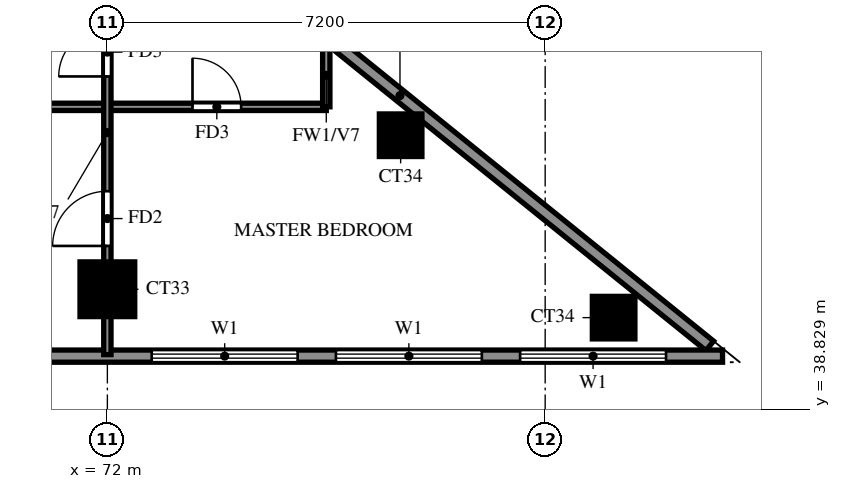
"""IFC4 building model, lengths in metres.
Left out: names, types, materials, properties, quantities, classifications, styles, units other than length and angle.
Written with IfcOpenShell. Run it as: python <this file> out.ifc"""

import sys

from ifc_helpers import new_model, si_unit, direction, frame, frame_2d, origin, origin_2d, place, context, subcontext, project, spatial, rectangle, extrude, source, transform, mapped, element, fill, save


model = new_model("IFC4")
c1 = context("Model", 3, precision=1e-05, world=origin(), true_north=direction((0.0, 1.0)))
c2 = subcontext(c1, "Body", "Model", "MODEL_VIEW")
j1 = project(units=[si_unit("LENGTHUNIT", "METRE"), si_unit("PLANEANGLEUNIT", "RADIAN")], contexts=[c1])
p1 = place(None, origin())
s1 = spatial("IfcSite", under=j1, at=p1, CompositionType="ELEMENT")
p2 = place(p1, origin())
s2 = spatial("IfcBuilding", under=s1, at=p2, CompositionType="ELEMENT")
p3 = place(p2, frame((0.0, 0.0, 229.0)))
s3 = spatial("IfcBuildingStorey", under=s2, at=p3, CompositionType="ELEMENT", Elevation=229.0)
m1 = source(origin(), c2, "Body", "SweptSolid", [
    extrude(rectangle(XDim=0.7, YDim=0.7, at=origin_2d()), origin(), (0.0, 0.0, 1.0), 3.22),
])
p4 = place(p3, frame((80.326, 40.333, 0.0), z_axis=(0.0, 0.0, 1.0), x_axis=(1.0, 0.0, 0.0)))
e1 = element("IfcColumn", 1, at=p4, inside=s3, PredefinedType="COLUMN", context=c2, shape_type="MappedRepresentation", body=[
    mapped(m1, transform((0.0, 0.0, 0.0))),
])
m2 = source(origin(), c2, "Body", "SweptSolid", [
    extrude(rectangle(XDim=0.9, YDim=0.9, at=origin_2d()), origin(), (0.0, 0.0, 1.0), 3.22),
])
p5 = place(p3, frame((72.0, 40.8, 0.0), z_axis=(0.0, 0.0, 1.0), x_axis=(1.0, 0.0, 0.0)))
e2 = element("IfcColumn", 2, at=p5, inside=s3, PredefinedType="COLUMN", context=c2, shape_type="MappedRepresentation", body=[
    mapped(m2, transform((0.0, 0.0, 0.0))),
])
p6 = place(p3, frame((76.823, 43.333, 0.0), z_axis=(0.0, 0.0, 1.0), x_axis=(1.0, 0.0, 0.0)))
e3 = element("IfcColumn", 3, at=p6, inside=s3, PredefinedType="COLUMN", context=c2, shape_type="MappedRepresentation", body=[
    mapped(m1, transform((0.0, 0.0, 0.0))),
])
p7 = place(p3, frame((81.907, 39.87, 0.0), z_axis=(0.0, 0.0, 1.0), x_axis=(-0.777936274417, 0.62834318087, 0.0)))
e4 = element("IfcWall", 4, at=p7, inside=s3, PredefinedType="SOLIDWALL", context=c2, shape_type="SweptSolid", body=[
    extrude(rectangle(XDim=13.099, YDim=0.2, at=frame_2d((6.549, 0.0))), origin(), (0.0, 0.0, 1.0), 3.22),
])
p8 = place(p7, frame((9.938, 0.0, 1.5)))
e5 = element("IfcOpeningElement", 5, at=p8, cuts=e4, PredefinedType="OPENING", context=c2, shape_type="SweptSolid", body=[
    extrude(rectangle(XDim=0.9, YDim=0.9, at=frame_2d((0.45, 0.45))), frame((0.0, 0.11, 0.0), z_axis=(0.0, -1.0, 0.0), x_axis=(1.0, 0.0, 0.0)), (0.0, 0.0, 1.0), 0.22),
])
p9 = place(p3, frame((58.8, 39.7, 0.0), z_axis=(0.0, 0.0, 1.0), x_axis=(1.0, 0.0, 0.0)))
e6 = element("IfcWall", 6, at=p9, inside=s3, PredefinedType="SOLIDWALL", context=c2, shape_type="SweptSolid", body=[
    extrude(rectangle(XDim=23.317, YDim=0.2, at=frame_2d((11.658, 0.0))), origin(), (0.0, 0.0, 1.0), 3.22),
])
p10 = place(p9, frame((6.9, 0.0, 0.0)))
e7 = element("IfcOpeningElement", 7, at=p10, cuts=e6, PredefinedType="OPENING", context=c2, shape_type="SweptSolid", body=[
    extrude(rectangle(XDim=1.8, YDim=2.4, at=frame_2d((0.9, 1.2))), frame((0.0, 0.11, 0.0), z_axis=(0.0, -1.0, 0.0), x_axis=(1.0, 0.0, 0.0)), (0.0, 0.0, 1.0), 0.22),
])
p11 = place(p9, frame((1.5, 0.0, 0.6)))
e8 = element("IfcOpeningElement", 8, at=p11, cuts=e6, PredefinedType="OPENING", context=c2, shape_type="SweptSolid", body=[
    extrude(rectangle(XDim=1.8, YDim=2.4, at=frame_2d((0.9, 1.2))), frame((0.0, 0.11, 0.0), z_axis=(0.0, -1.0, 0.0), x_axis=(1.0, 0.0, 0.0)), (0.0, 0.0, 1.0), 0.22),
])
p12 = place(p9, frame((4.5, 0.0, 0.6)))
e9 = element("IfcOpeningElement", 9, at=p12, cuts=e6, PredefinedType="OPENING", context=c2, shape_type="SweptSolid", body=[
    extrude(rectangle(XDim=1.8, YDim=2.4, at=frame_2d((0.9, 1.2))), frame((0.0, 0.11, 0.0), z_axis=(0.0, -1.0, 0.0), x_axis=(1.0, 0.0, 0.0)), (0.0, 0.0, 1.0), 0.22),
])
p13 = place(p9, frame((13.929, 0.0, 0.6)))
e10 = element("IfcOpeningElement", 10, at=p13, cuts=e6, PredefinedType="OPENING", context=c2, shape_type="SweptSolid", body=[
    extrude(rectangle(XDim=2.4, YDim=2.4, at=frame_2d((1.2, 1.2))), frame((0.0, 0.11, 0.0), z_axis=(0.0, -1.0, 0.0), x_axis=(1.0, 0.0, 0.0)), (0.0, 0.0, 1.0), 0.22),
])
p14 = place(p9, frame((16.958, 0.0, 0.6)))
e11 = element("IfcOpeningElement", 11, at=p14, cuts=e6, PredefinedType="OPENING", context=c2, shape_type="SweptSolid", body=[
    extrude(rectangle(XDim=2.4, YDim=2.4, at=frame_2d((1.2, 1.2))), frame((0.0, 0.11, 0.0), z_axis=(0.0, -1.0, 0.0), x_axis=(1.0, 0.0, 0.0)), (0.0, 0.0, 1.0), 0.22),
])
p15 = place(p9, frame((19.988, 0.0, 0.6)))
e12 = element("IfcOpeningElement", 12, at=p15, cuts=e6, PredefinedType="OPENING", context=c2, shape_type="SweptSolid", body=[
    extrude(rectangle(XDim=2.4, YDim=2.4, at=frame_2d((1.2, 1.2))), frame((0.0, 0.11, 0.0), z_axis=(0.0, -1.0, 0.0), x_axis=(1.0, 0.0, 0.0)), (0.0, 0.0, 1.0), 0.22),
])
p16 = place(p3, frame((60.0, 43.8, 0.0), z_axis=(0.0, 0.0, 1.0), x_axis=(1.0, 0.0, 0.0)))
e13 = element("IfcWall", 13, at=p16, inside=s3, PredefinedType="PARTITIONING", context=c2, shape_type="SweptSolid", body=[
    extrude(rectangle(XDim=15.6, YDim=0.12, at=frame_2d((7.8, 0.0))), origin(), (0.0, 0.0, 1.0), 3.22),
])
p17 = place(p16, frame((9.75, 0.0, 0.0)))
e14 = element("IfcOpeningElement", 14, at=p17, cuts=e13, PredefinedType="OPENING", context=c2, shape_type="SweptSolid", body=[
    extrude(rectangle(XDim=0.9, YDim=2.1, at=frame_2d((0.45, 1.05))), frame((0.0, 0.07, 0.0), z_axis=(0.0, -1.0, 0.0), x_axis=(1.0, 0.0, 0.0)), (0.0, 0.0, 1.0), 0.14),
])
p18 = place(p16, frame((3.45, 0.0, 0.0)))
e15 = element("IfcOpeningElement", 15, at=p18, cuts=e13, PredefinedType="OPENING", context=c2, shape_type="SweptSolid", body=[
    extrude(rectangle(XDim=1.5, YDim=2.1, at=frame_2d((0.75, 1.05))), frame((0.0, 0.07, 0.0), z_axis=(0.0, -1.0, 0.0), x_axis=(1.0, 0.0, 0.0)), (0.0, 0.0, 1.0), 0.14),
])
p19 = place(p16, frame((13.4, 0.0, 0.0)))
e16 = element("IfcOpeningElement", 16, at=p19, cuts=e13, PredefinedType="OPENING", context=c2, shape_type="SweptSolid", body=[
    extrude(rectangle(XDim=0.8, YDim=2.1, at=frame_2d((0.4, 1.05))), frame((0.0, 0.07, 0.0), z_axis=(0.0, -1.0, 0.0), x_axis=(1.0, 0.0, 0.0)), (0.0, 0.0, 1.0), 0.14),
])
p20 = place(p3, frame((72.0, 39.725, 0.0), z_axis=(0.0, 0.0, 1.0), x_axis=(0.0, 1.0, 0.0)))
e17 = element("IfcWall", 17, at=p20, inside=s3, PredefinedType="PARTITIONING", context=c2, shape_type="SweptSolid", body=[
    extrude(rectangle(XDim=8.114, YDim=0.12, at=frame_2d((4.057, 0.0))), origin(), (0.0, 0.0, 1.0), 2.32),
])
p21 = place(p20, frame((1.788, 0.0, 0.0)))
e18 = element("IfcOpeningElement", 18, at=p21, cuts=e17, PredefinedType="OPENING", context=c2, shape_type="SweptSolid", body=[
    extrude(rectangle(XDim=0.9, YDim=2.1, at=frame_2d((0.45, 1.05))), frame((0.0, 0.07, 0.0), z_axis=(0.0, -1.0, 0.0), x_axis=(1.0, 0.0, 0.0)), (0.0, 0.0, 1.0), 0.14),
])
p22 = place(p20, frame((4.575, 0.0, 0.0)))
e19 = element("IfcOpeningElement", 19, at=p22, cuts=e17, PredefinedType="OPENING", context=c2, shape_type="SweptSolid", body=[
    extrude(rectangle(XDim=0.8, YDim=2.1, at=frame_2d((0.4, 1.05))), frame((0.0, 0.07, 0.0), z_axis=(0.0, -1.0, 0.0), x_axis=(1.0, 0.0, 0.0)), (0.0, 0.0, 1.0), 0.14),
])
p23 = place(p3, frame((75.6, 43.8, 0.0), z_axis=(0.0, 0.0, 1.0), x_axis=(0.0, 1.0, 0.0)))
e20 = element("IfcWall", 20, at=p23, inside=s3, PredefinedType="PARTITIONING", context=c2, shape_type="SweptSolid", body=[
    extrude(rectangle(XDim=1.035, YDim=0.12, at=frame_2d((0.518, 0.0))), origin(), (0.0, 0.0, 1.0), 2.32),
])
p24 = place(p13, origin())
e21 = element("IfcWindow", 21, at=p24, inside=s3, PartitioningType="DOUBLE_PANEL_VERTICAL", PredefinedType="WINDOW", context=c2, shape_type="SweptSolid", body=[
    extrude(rectangle(XDim=2.4, YDim=2.4, at=frame_2d((1.2, 1.2))), frame((0.0, 0.03, 0.0), z_axis=(0.0, -1.0, 0.0), x_axis=(1.0, 0.0, 0.0)), (0.0, 0.0, 1.0), 0.06),
])
fill(e10, e21)
p25 = place(p14, origin())
e22 = element("IfcWindow", 22, at=p25, inside=s3, PartitioningType="DOUBLE_PANEL_VERTICAL", PredefinedType="WINDOW", context=c2, shape_type="SweptSolid", body=[
    extrude(rectangle(XDim=2.4, YDim=2.4, at=frame_2d((1.2, 1.2))), frame((0.0, 0.03, 0.0), z_axis=(0.0, -1.0, 0.0), x_axis=(1.0, 0.0, 0.0)), (0.0, 0.0, 1.0), 0.06),
])
fill(e11, e22)
p26 = place(p15, origin())
e23 = element("IfcWindow", 23, at=p26, inside=s3, PartitioningType="DOUBLE_PANEL_VERTICAL", PredefinedType="WINDOW", context=c2, shape_type="SweptSolid", body=[
    extrude(rectangle(XDim=2.4, YDim=2.4, at=frame_2d((1.2, 1.2))), frame((0.0, 0.03, 0.0), z_axis=(0.0, -1.0, 0.0), x_axis=(1.0, 0.0, 0.0)), (0.0, 0.0, 1.0), 0.06),
])
fill(e12, e23)
p27 = place(p21, origin())
e24 = element("IfcDoor", 24, at=p27, inside=s3, OperationType="SINGLE_SWING_LEFT", PredefinedType="DOOR", context=c2, shape_type="SweptSolid", body=[
    extrude(rectangle(XDim=0.9, YDim=2.1, at=frame_2d((0.45, 1.05))), frame((0.0, 0.025, 0.0), z_axis=(0.0, -1.0, 0.0), x_axis=(1.0, 0.0, 0.0)), (0.0, 0.0, 1.0), 0.05),
])
fill(e18, e24)
p28 = place(p22, origin())
e25 = element("IfcDoor", 25, at=p28, inside=s3, OperationType="SINGLE_SWING_LEFT", PredefinedType="DOOR", context=c2, shape_type="SweptSolid", body=[
    extrude(rectangle(XDim=0.8, YDim=2.1, at=frame_2d((0.4, 1.05))), frame((0.0, 0.025, 0.0), z_axis=(0.0, -1.0, 0.0), x_axis=(1.0, 0.0, 0.0)), (0.0, 0.0, 1.0), 0.05),
])
fill(e19, e25)
p29 = place(p19, origin())
e26 = element("IfcDoor", 26, at=p29, inside=s3, OperationType="SINGLE_SWING_LEFT", PredefinedType="DOOR", context=c2, shape_type="SweptSolid", body=[
    extrude(rectangle(XDim=0.8, YDim=2.1, at=frame_2d((0.4, 1.05))), frame((0.0, 0.025, 0.0), z_axis=(0.0, -1.0, 0.0), x_axis=(1.0, 0.0, 0.0)), (0.0, 0.0, 1.0), 0.05),
])
fill(e16, e26)
save(model, sys.argv[1])
